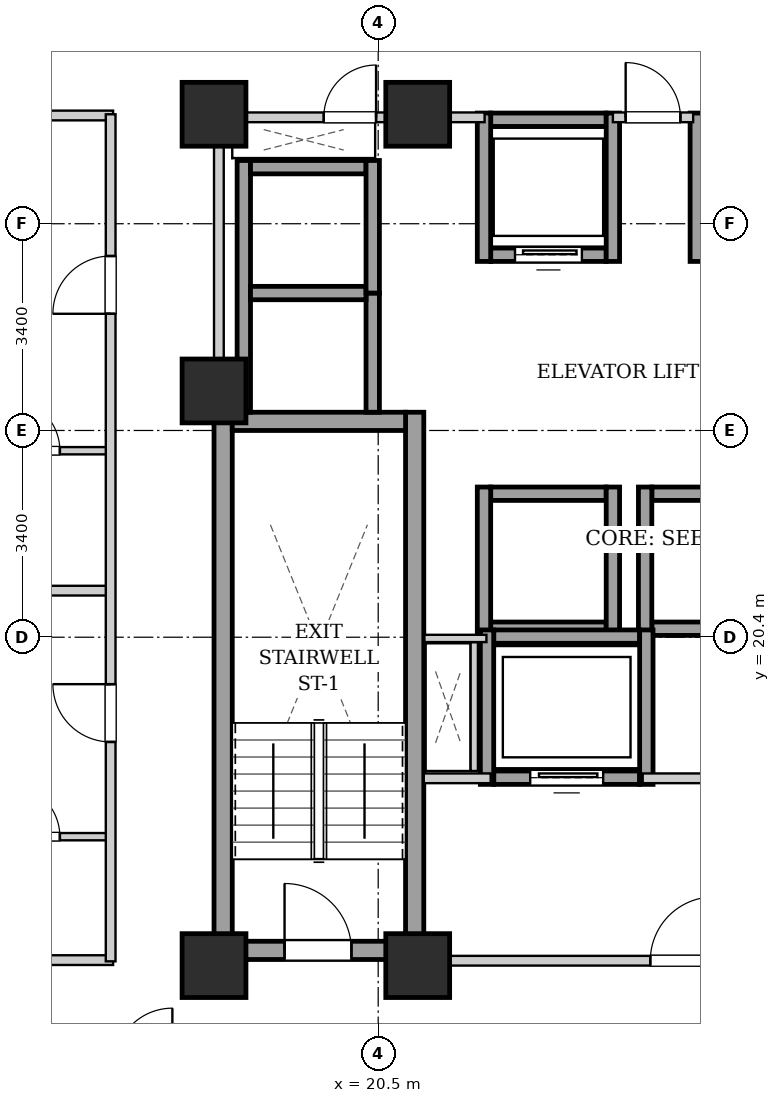
"""IFC4 building model, lengths in metres.
Left out: names, types, materials, properties, quantities, classifications, styles, units other than length and angle.
Written with IfcOpenShell. Run it as: python <this file> out.ifc"""

import sys

from ifc_helpers import new_model, si_unit, direction, frame, frame_2d, origin, origin_2d, place, context, subcontext, project, spatial, rectangle, extrude, element, fill, save


model = new_model("IFC4")
c1 = context("Model", 3, precision=1e-05, world=origin(), true_north=direction((0.0, 1.0)))
c2 = subcontext(c1, "Body", "Model", "MODEL_VIEW")
j1 = project(units=[si_unit("LENGTHUNIT", "METRE"), si_unit("PLANEANGLEUNIT", "RADIAN")], contexts=[c1])
p1 = place(None, origin())
s1 = spatial("IfcSite", under=j1, at=p1, CompositionType="ELEMENT")
p2 = place(p1, origin())
s2 = spatial("IfcBuilding", under=s1, at=p2, CompositionType="ELEMENT")
p3 = place(p2, frame((0.0, 0.0, 87.9)))
s3 = spatial("IfcBuildingStorey", under=s2, at=p3, CompositionType="ELEMENT", Elevation=87.9)
for number, where, z_axis, x_axis in (
    (1, (17.8, 15.0, 0.0), (0.0, 0.0, 1.0), (1.0, 0.0, 0.0)),
    (2, (21.15, 15.0, 0.0), (0.0, 0.0, 1.0), (1.0, 0.0, 0.0)),
    (3, (17.8, 29.0, 0.0), (0.0, 0.0, 1.0), (1.0, 0.0, 0.0)),
    (4, (21.15, 29.0, 0.0), (0.0, 0.0, 1.0), (1.0, 0.0, 0.0)),
    (5, (17.8, 24.45, 0.0), (0.0, 0.0, 1.0), (1.0, 0.0, 0.0)),
):
    element("IfcColumn", number, at=place(p3, frame(where, z_axis=z_axis, x_axis=x_axis)), inside=s3, PredefinedType="COLUMN", context=c2, shape_type="SweptSolid", body=[
        extrude(rectangle(XDim=1.05, YDim=1.05, at=origin_2d()), origin(), (0.0, 0.0, 1.0), 3.2),
    ])
for number, where, z_axis, x_axis in (
    (6, (17.95, 15.1, 0.0), (0.0, 0.0, 1.0), (0.0, 1.0, 0.0)),
    (7, (21.1, 15.1, 0.0), (0.0, 0.0, 1.0), (0.0, 1.0, 0.0)),
):
    element("IfcWall", number, at=place(p3, frame(where, z_axis=z_axis, x_axis=x_axis)), inside=s3, PredefinedType="SHEAR", context=c2, shape_type="SweptSolid", body=[
        extrude(rectangle(XDim=9.0, YDim=0.3, at=frame_2d((4.5, 0.0))), origin(), (0.0, 0.0, 1.0), 2.94),
    ])
p4 = place(p3, frame((18.1, 23.95, 0.0), z_axis=(0.0, 0.0, 1.0), x_axis=(1.0, 0.0, 0.0)))
e8 = element("IfcWall", 8, at=p4, inside=s3, PredefinedType="SHEAR", context=c2, shape_type="SweptSolid", body=[
    extrude(rectangle(XDim=2.85, YDim=0.3, at=frame_2d((1.425, 0.0))), origin(), (0.0, 0.0, 1.0), 2.94),
])
p5 = place(p3, frame((18.1, 15.25, 0.0), z_axis=(0.0, 0.0, 1.0), x_axis=(1.0, 0.0, 0.0)))
e9 = element("IfcWall", 9, at=p5, inside=s3, PredefinedType="SHEAR", context=c2, shape_type="SweptSolid", body=[
    extrude(rectangle(XDim=2.85, YDim=0.3, at=frame_2d((1.425, 0.0))), origin(), (0.0, 0.0, 1.0), 2.94),
])
p6 = place(p5, frame((0.86, 0.0, 0.0)))
e10 = element("IfcOpeningElement", 10, at=p6, cuts=e9, PredefinedType="OPENING", context=c2, shape_type="SweptSolid", body=[
    extrude(rectangle(XDim=1.1, YDim=2.05, at=frame_2d((0.55, 1.025))), frame((0.0, 0.16, 0.0), z_axis=(0.0, -1.0, 0.0), x_axis=(1.0, 0.0, 0.0)), (0.0, 0.0, 1.0), 0.32),
])
p7 = place(p3, frame((22.35, 26.69, 0.0), z_axis=(0.0, 0.0, 1.0), x_axis=(1.0, 0.0, 0.0)))
e11 = element("IfcWall", 11, at=p7, inside=s3, PredefinedType="SHEAR", context=c2, shape_type="SweptSolid", body=[
    extrude(rectangle(XDim=1.9, YDim=0.22, at=frame_2d((0.95, 0.0))), origin(), (0.0, 0.0, 1.0), 2.94),
])
p8 = place(p7, frame((0.4, 0.0, 0.0)))
e12 = element("IfcOpeningElement", 12, at=p8, cuts=e11, PredefinedType="OPENING", context=c2, shape_type="SweptSolid", body=[
    extrude(rectangle(XDim=1.1, YDim=2.15, at=frame_2d((0.55, 1.075))), frame((0.0, 0.12, 0.0), z_axis=(0.0, -1.0, 0.0), x_axis=(1.0, 0.0, 0.0)), (0.0, 0.0, 1.0), 0.24),
])
p9 = place(p3, frame((22.35, 28.91, 0.0), z_axis=(0.0, 0.0, 1.0), x_axis=(1.0, 0.0, 0.0)))
e13 = element("IfcWall", 13, at=p9, inside=s3, PredefinedType="SHEAR", context=c2, shape_type="SweptSolid", body=[
    extrude(rectangle(XDim=1.9, YDim=0.22, at=frame_2d((0.95, 0.0))), origin(), (0.0, 0.0, 1.0), 2.94),
])
for number, where, z_axis, x_axis in (
    (14, (22.24, 26.58, 0.0), (0.0, 0.0, 1.0), (0.0, 1.0, 0.0)),
    (15, (24.36, 26.58, 0.0), (0.0, 0.0, 1.0), (0.0, 1.0, 0.0)),
    (16, (25.74, 26.58, 0.0), (0.0, 0.0, 1.0), (0.0, 1.0, 0.0)),
):
    element("IfcWall", number, at=place(p3, frame(where, z_axis=z_axis, x_axis=x_axis)), inside=s3, PredefinedType="SHEAR", context=c2, shape_type="SweptSolid", body=[
        extrude(rectangle(XDim=2.44, YDim=0.22, at=frame_2d((1.22, 0.0))), origin(), (0.0, 0.0, 1.0), 2.94),
    ])
for number, where, z_axis, x_axis in (
    (17, (22.35, 20.54, 0.0), (0.0, 0.0, 1.0), (1.0, 0.0, 0.0)),
    (18, (22.35, 22.76, 0.0), (0.0, 0.0, 1.0), (1.0, 0.0, 0.0)),
):
    element("IfcWall", number, at=place(p3, frame(where, z_axis=z_axis, x_axis=x_axis)), inside=s3, PredefinedType="SHEAR", context=c2, shape_type="SweptSolid", body=[
        extrude(rectangle(XDim=1.9, YDim=0.22, at=frame_2d((0.95, 0.0))), origin(), (0.0, 0.0, 1.0), 2.94),
    ])
for number, where, z_axis, x_axis in (
    (19, (22.24, 20.43, 0.0), (0.0, 0.0, 1.0), (0.0, 1.0, 0.0)),
    (20, (24.36, 20.43, 0.0), (0.0, 0.0, 1.0), (0.0, 1.0, 0.0)),
):
    element("IfcWall", number, at=place(p3, frame(where, z_axis=z_axis, x_axis=x_axis)), inside=s3, PredefinedType="SHEAR", context=c2, shape_type="SweptSolid", body=[
        extrude(rectangle(XDim=2.44, YDim=0.22, at=frame_2d((1.22, 0.0))), origin(), (0.0, 0.0, 1.0), 2.94),
    ])
for number, where, z_axis, x_axis in (
    (21, (25.0, 20.54, 0.0), (0.0, 0.0, 1.0), (1.0, 0.0, 0.0)),
    (22, (25.0, 22.76, 0.0), (0.0, 0.0, 1.0), (1.0, 0.0, 0.0)),
):
    element("IfcWall", number, at=place(p3, frame(where, z_axis=z_axis, x_axis=x_axis)), inside=s3, PredefinedType="SHEAR", context=c2, shape_type="SweptSolid", body=[
        extrude(rectangle(XDim=1.9, YDim=0.22, at=frame_2d((0.95, 0.0))), origin(), (0.0, 0.0, 1.0), 2.94),
    ])
p10 = place(p3, frame((24.89, 20.43, 0.0), z_axis=(0.0, 0.0, 1.0), x_axis=(0.0, 1.0, 0.0)))
e23 = element("IfcWall", 23, at=p10, inside=s3, PredefinedType="SHEAR", context=c2, shape_type="SweptSolid", body=[
    extrude(rectangle(XDim=2.44, YDim=0.22, at=frame_2d((1.22, 0.0))), origin(), (0.0, 0.0, 1.0), 2.94),
])
p11 = place(p3, frame((18.29, 24.1, 0.0), z_axis=(0.0, 0.0, 1.0), x_axis=(0.0, 1.0, 0.0)))
e24 = element("IfcWall", 24, at=p11, inside=s3, PredefinedType="SHEAR", context=c2, shape_type="SweptSolid", body=[
    extrude(rectangle(XDim=4.14, YDim=0.22, at=frame_2d((2.07, 0.0))), origin(), (0.0, 0.0, 1.0), 2.94),
])
p12 = place(p3, frame((20.41, 24.1, 0.0), z_axis=(0.0, 0.0, 1.0), x_axis=(0.0, 1.0, 0.0)))
e25 = element("IfcWall", 25, at=p12, inside=s3, PredefinedType="SHEAR", context=c2, shape_type="SweptSolid", body=[
    extrude(rectangle(XDim=1.96, YDim=0.22, at=frame_2d((0.98, 0.0))), origin(), (0.0, 0.0, 1.0), 2.94),
])
for number, where, z_axis, x_axis in (
    (26, (18.4, 26.06, 0.0), (0.0, 0.0, 1.0), (1.0, 0.0, 0.0)),
    (27, (18.4, 28.13, 0.0), (0.0, 0.0, 1.0), (1.0, 0.0, 0.0)),
):
    element("IfcWall", number, at=place(p3, frame(where, z_axis=z_axis, x_axis=x_axis)), inside=s3, PredefinedType="SHEAR", context=c2, shape_type="SweptSolid", body=[
        extrude(rectangle(XDim=1.9, YDim=0.22, at=frame_2d((0.95, 0.0))), origin(), (0.0, 0.0, 1.0), 2.94),
    ])
p13 = place(p3, frame((20.41, 26.06, 0.0), z_axis=(0.0, 0.0, 1.0), x_axis=(0.0, 1.0, 0.0)))
e28 = element("IfcWall", 28, at=p13, inside=s3, PredefinedType="SHEAR", context=c2, shape_type="SweptSolid", body=[
    extrude(rectangle(XDim=2.18, YDim=0.22, at=frame_2d((1.09, 0.0))), origin(), (0.0, 0.0, 1.0), 2.94),
])
p14 = place(p3, frame((22.4, 18.09, 0.0), z_axis=(0.0, 0.0, 1.0), x_axis=(1.0, 0.0, 0.0)))
e29 = element("IfcWall", 29, at=p14, inside=s3, PredefinedType="SHEAR", context=c2, shape_type="SweptSolid", body=[
    extrude(rectangle(XDim=2.4, YDim=0.22, at=frame_2d((1.2, 0.0))), origin(), (0.0, 0.0, 1.0), 2.94),
])
p15 = place(p14, frame((0.6, 0.0, 0.0)))
e30 = element("IfcOpeningElement", 30, at=p15, cuts=e29, PredefinedType="OPENING", context=c2, shape_type="SweptSolid", body=[
    extrude(rectangle(XDim=1.2, YDim=2.15, at=frame_2d((0.6, 1.075))), frame((0.0, 0.12, 0.0), z_axis=(0.0, -1.0, 0.0), x_axis=(1.0, 0.0, 0.0)), (0.0, 0.0, 1.0), 0.24),
])
p16 = place(p3, frame((22.4, 20.41, 0.0), z_axis=(0.0, 0.0, 1.0), x_axis=(1.0, 0.0, 0.0)))
e31 = element("IfcWall", 31, at=p16, inside=s3, PredefinedType="SHEAR", context=c2, shape_type="SweptSolid", body=[
    extrude(rectangle(XDim=2.4, YDim=0.22, at=frame_2d((1.2, 0.0))), origin(), (0.0, 0.0, 1.0), 2.94),
])
for number, where, z_axis, x_axis in (
    (32, (22.29, 17.98, 0.0), (0.0, 0.0, 1.0), (0.0, 1.0, 0.0)),
    (33, (24.91, 17.98, 0.0), (0.0, 0.0, 1.0), (0.0, 1.0, 0.0)),
):
    element("IfcWall", number, at=place(p3, frame(where, z_axis=z_axis, x_axis=x_axis)), inside=s3, PredefinedType="SHEAR", context=c2, shape_type="SweptSolid", body=[
        extrude(rectangle(XDim=2.54, YDim=0.22, at=frame_2d((1.27, 0.0))), origin(), (0.0, 0.0, 1.0), 2.94),
    ])
p17 = place(p3, frame((21.25, 15.08, 0.0), z_axis=(0.0, 0.0, 1.0), x_axis=(1.0, 0.0, 0.0)))
e34 = element("IfcWall", 34, at=p17, inside=s3, PredefinedType="PARTITIONING", context=c2, shape_type="SweptSolid", body=[
    extrude(rectangle(XDim=8.5, YDim=0.16, at=frame_2d((4.25, 0.0))), origin(), (0.0, 0.0, 1.0), 2.309),
])
p18 = place(p17, frame((3.725, 0.0, 0.0)))
e35 = element("IfcOpeningElement", 35, at=p18, cuts=e34, PredefinedType="OPENING", context=c2, shape_type="SweptSolid", body=[
    extrude(rectangle(XDim=1.05, YDim=2.05, at=frame_2d((0.525, 1.025))), frame((0.0, 0.09, 0.0), z_axis=(0.0, -1.0, 0.0), x_axis=(1.0, 0.0, 0.0)), (0.0, 0.0, 1.0), 0.18),
])
p19 = place(p3, frame((21.25, 18.08, 0.0), z_axis=(0.0, 0.0, 1.0), x_axis=(1.0, 0.0, 0.0)))
e36 = element("IfcWall", 36, at=p19, inside=s3, PredefinedType="PARTITIONING", context=c2, shape_type="SweptSolid", body=[
    extrude(rectangle(XDim=1.1, YDim=0.16, at=frame_2d((0.55, 0.0))), origin(), (0.0, 0.0, 1.0), 2.94),
])
p20 = place(p3, frame((24.85, 18.08, 0.0), z_axis=(0.0, 0.0, 1.0), x_axis=(1.0, 0.0, 0.0)))
e37 = element("IfcWall", 37, at=p20, inside=s3, PredefinedType="PARTITIONING", context=c2, shape_type="SweptSolid", body=[
    extrude(rectangle(XDim=1.3, YDim=0.16, at=frame_2d((0.65, 0.0))), origin(), (0.0, 0.0, 1.0), 2.94),
])
p21 = place(p3, frame((17.88, 24.12, 0.0), z_axis=(0.0, 0.0, 1.0), x_axis=(0.0, 1.0, 0.0)))
e38 = element("IfcWall", 38, at=p21, inside=s3, PredefinedType="PARTITIONING", context=c2, shape_type="SweptSolid", body=[
    extrude(rectangle(XDim=4.76, YDim=0.16, at=frame_2d((2.38, 0.0))), origin(), (0.0, 0.0, 1.0), 2.275),
])
p22 = place(p3, frame((24.36, 28.95, 0.0), z_axis=(0.0, 0.0, 1.0), x_axis=(1.0, 0.0, 0.0)))
e39 = element("IfcWall", 39, at=p22, inside=s3, PredefinedType="PARTITIONING", context=c2, shape_type="SweptSolid", body=[
    extrude(rectangle(XDim=1.32, YDim=0.16, at=frame_2d((0.66, 0.0))), origin(), (0.0, 0.0, 1.0), 2.309),
])
p23 = place(p22, frame((0.21, 0.0, 0.0)))
e40 = element("IfcOpeningElement", 40, at=p23, cuts=e39, PredefinedType="OPENING", context=c2, shape_type="SweptSolid", body=[
    extrude(rectangle(XDim=0.9, YDim=2.05, at=frame_2d((0.45, 1.025))), frame((0.0, 0.09, 0.0), z_axis=(0.0, -1.0, 0.0), x_axis=(1.0, 0.0, 0.0)), (0.0, 0.0, 1.0), 0.18),
])
p24 = place(p3, frame((17.96, 28.95, 0.0), z_axis=(0.0, 0.0, 1.0), x_axis=(1.0, 0.0, 0.0)))
e41 = element("IfcWall", 41, at=p24, inside=s3, PredefinedType="PARTITIONING", context=c2, shape_type="SweptSolid", body=[
    extrude(rectangle(XDim=4.29, YDim=0.16, at=frame_2d((2.145, 0.0))), origin(), (0.0, 0.0, 1.0), 2.309),
])
p25 = place(p24, frame((1.645, 0.0, 0.0)))
e42 = element("IfcOpeningElement", 42, at=p25, cuts=e41, PredefinedType="OPENING", context=c2, shape_type="SweptSolid", body=[
    extrude(rectangle(XDim=0.86, YDim=2.05, at=frame_2d((0.43, 1.025))), frame((0.0, 0.09, 0.0), z_axis=(0.0, -1.0, 0.0), x_axis=(1.0, 0.0, 0.0)), (0.0, 0.0, 1.0), 0.18),
])
p26 = place(p3, frame((22.08, 18.2, 0.0), z_axis=(0.0, 0.0, 1.0), x_axis=(0.0, 1.0, 0.0)))
e43 = element("IfcWall", 43, at=p26, inside=s3, PredefinedType="PARTITIONING", context=c2, shape_type="SweptSolid", body=[
    extrude(rectangle(XDim=2.12, YDim=0.12, at=frame_2d((1.06, 0.0))), origin(), (0.0, 0.0, 1.0), 2.94),
])
p27 = place(p3, frame((22.28, 20.38, 0.0), z_axis=(0.0, 0.0, 1.0), x_axis=(-1.0, 0.0, 0.0)))
e44 = element("IfcWall", 44, at=p27, inside=s3, PredefinedType="PARTITIONING", context=c2, shape_type="SweptSolid", body=[
    extrude(rectangle(XDim=1.02, YDim=0.12, at=frame_2d((0.51, 0.0))), origin(), (0.0, 0.0, 1.0), 2.94),
])
for number, where, z_axis, x_axis in (
    (45, (7.78, 15.09, 0.0), (0.0, 0.0, 1.0), (1.0, 0.0, 0.0)),
    (46, (7.78, 28.98, 0.0), (0.0, 0.0, 1.0), (1.0, 0.0, 0.0)),
):
    element("IfcWall", number, at=place(p3, frame(where, z_axis=z_axis, x_axis=x_axis)), inside=s3, PredefinedType="PARTITIONING", context=c2, shape_type="SweptSolid", body=[
        extrude(rectangle(XDim=8.36, YDim=0.16, at=frame_2d((4.18, 0.0))), origin(), (0.0, 0.0, 1.0), 2.309),
    ])
p28 = place(p3, frame((9.82, 21.166, 0.0), z_axis=(0.0, 0.0, 1.0), x_axis=(1.0, 0.0, 0.0)))
e47 = element("IfcWall", 47, at=p28, inside=s3, PredefinedType="PARTITIONING", context=c2, shape_type="SweptSolid", body=[
    extrude(rectangle(XDim=6.24, YDim=0.16, at=frame_2d((3.12, 0.0))), origin(), (0.0, 0.0, 1.0), 2.94),
])
p29 = place(p3, frame((13.61, 17.12, 0.0), z_axis=(0.0, 0.0, 1.0), x_axis=(1.0, 0.0, 0.0)))
e48 = element("IfcWall", 48, at=p29, inside=s3, PredefinedType="PARTITIONING", context=c2, shape_type="SweptSolid", body=[
    extrude(rectangle(XDim=2.45, YDim=0.12, at=frame_2d((1.225, 0.0))), origin(), (0.0, 0.0, 1.0), 2.94),
])
p30 = place(p29, frame((0.795, 0.0, 0.0)))
e49 = element("IfcOpeningElement", 49, at=p30, cuts=e48, PredefinedType="OPENING", context=c2, shape_type="SweptSolid", body=[
    extrude(rectangle(XDim=0.86, YDim=2.05, at=frame_2d((0.43, 1.025))), frame((0.0, 0.07, 0.0), z_axis=(0.0, -1.0, 0.0), x_axis=(1.0, 0.0, 0.0)), (0.0, 0.0, 1.0), 0.14),
])
p31 = place(p3, frame((13.61, 23.467, 0.0), z_axis=(0.0, 0.0, 1.0), x_axis=(1.0, 0.0, 0.0)))
e50 = element("IfcWall", 50, at=p31, inside=s3, PredefinedType="PARTITIONING", context=c2, shape_type="SweptSolid", body=[
    extrude(rectangle(XDim=2.45, YDim=0.12, at=frame_2d((1.225, 0.0))), origin(), (0.0, 0.0, 1.0), 2.94),
])
p32 = place(p31, frame((0.795, 0.0, 0.0)))
e51 = element("IfcOpeningElement", 51, at=p32, cuts=e50, PredefinedType="OPENING", context=c2, shape_type="SweptSolid", body=[
    extrude(rectangle(XDim=0.86, YDim=2.05, at=frame_2d((0.43, 1.025))), frame((0.0, 0.07, 0.0), z_axis=(0.0, -1.0, 0.0), x_axis=(1.0, 0.0, 0.0)), (0.0, 0.0, 1.0), 0.14),
])
p33 = place(p3, frame((16.1, 15.07, 0.0), z_axis=(0.0, 0.0, 1.0), x_axis=(0.0, 1.0, 0.0)))
e52 = element("IfcWall", 52, at=p33, inside=s3, PredefinedType="PARTITIONING", context=c2, shape_type="SweptSolid", body=[
    extrude(rectangle(XDim=13.93, YDim=0.16, at=frame_2d((6.965, 0.0))), origin(), (0.0, 0.0, 1.0), 2.94),
])
p34 = place(p33, frame((3.608, 0.0, 0.0)))
e53 = element("IfcOpeningElement", 53, at=p34, cuts=e52, PredefinedType="OPENING", context=c2, shape_type="SweptSolid", body=[
    extrude(rectangle(XDim=0.95, YDim=2.1, at=frame_2d((0.475, 1.05))), frame((0.0, 0.09, 0.0), z_axis=(0.0, -1.0, 0.0), x_axis=(1.0, 0.0, 0.0)), (0.0, 0.0, 1.0), 0.18),
])
p35 = place(p33, frame((10.649, 0.0, 0.0)))
e54 = element("IfcOpeningElement", 54, at=p35, cuts=e52, PredefinedType="OPENING", context=c2, shape_type="SweptSolid", body=[
    extrude(rectangle(XDim=0.95, YDim=2.1, at=frame_2d((0.475, 1.05))), frame((0.0, 0.09, 0.0), z_axis=(0.0, -1.0, 0.0), x_axis=(1.0, 0.0, 0.0)), (0.0, 0.0, 1.0), 0.18),
])
p36 = place(p6, origin())
e55 = element("IfcDoor", 55, at=p36, inside=s3, OperationType="SINGLE_SWING_LEFT", PredefinedType="DOOR", context=c2, shape_type="SweptSolid", body=[
    extrude(rectangle(XDim=1.1, YDim=2.05, at=frame_2d((0.55, 1.025))), frame((0.0, 0.025, 0.0), z_axis=(0.0, -1.0, 0.0), x_axis=(1.0, 0.0, 0.0)), (0.0, 0.0, 1.0), 0.05),
])
fill(e10, e55)
p37 = place(p8, origin())
e56 = element("IfcDoor", 56, at=p37, inside=s3, OperationType="SLIDING_TO_LEFT", PredefinedType="DOOR", context=c2, shape_type="SweptSolid", body=[
    extrude(rectangle(XDim=1.1, YDim=2.15, at=frame_2d((0.55, 1.075))), frame((0.0, 0.025, 0.0), z_axis=(0.0, -1.0, 0.0), x_axis=(1.0, 0.0, 0.0)), (0.0, 0.0, 1.0), 0.05),
])
fill(e12, e56)
p38 = place(p15, origin())
e57 = element("IfcDoor", 57, at=p38, inside=s3, OperationType="SLIDING_TO_LEFT", PredefinedType="DOOR", context=c2, shape_type="SweptSolid", body=[
    extrude(rectangle(XDim=1.2, YDim=2.15, at=frame_2d((0.6, 1.075))), frame((0.0, 0.025, 0.0), z_axis=(0.0, -1.0, 0.0), x_axis=(1.0, 0.0, 0.0)), (0.0, 0.0, 1.0), 0.05),
])
fill(e30, e57)
p39 = place(p18, origin())
e58 = element("IfcDoor", 58, at=p39, inside=s3, OperationType="SINGLE_SWING_RIGHT", PredefinedType="DOOR", context=c2, shape_type="SweptSolid", body=[
    extrude(rectangle(XDim=1.05, YDim=2.05, at=frame_2d((0.525, 1.025))), frame((0.0, 0.025, 0.0), z_axis=(0.0, -1.0, 0.0), x_axis=(1.0, 0.0, 0.0)), (0.0, 0.0, 1.0), 0.05),
])
fill(e35, e58)
p40 = place(p23, origin())
e59 = element("IfcDoor", 59, at=p40, inside=s3, OperationType="SINGLE_SWING_LEFT", PredefinedType="DOOR", context=c2, shape_type="SweptSolid", body=[
    extrude(rectangle(XDim=0.9, YDim=2.05, at=frame_2d((0.45, 1.025))), frame((0.0, 0.025, 0.0), z_axis=(0.0, -1.0, 0.0), x_axis=(1.0, 0.0, 0.0)), (0.0, 0.0, 1.0), 0.05),
])
fill(e40, e59)
p41 = place(p25, origin())
e60 = element("IfcDoor", 60, at=p41, inside=s3, OperationType="SINGLE_SWING_RIGHT", PredefinedType="DOOR", context=c2, shape_type="SweptSolid", body=[
    extrude(rectangle(XDim=0.86, YDim=2.05, at=frame_2d((0.43, 1.025))), frame((0.0, 0.025, 0.0), z_axis=(0.0, -1.0, 0.0), x_axis=(1.0, 0.0, 0.0)), (0.0, 0.0, 1.0), 0.05),
])
fill(e42, e60)
p42 = place(p30, origin())
e61 = element("IfcDoor", 61, at=p42, inside=s3, OperationType="SINGLE_SWING_LEFT", PredefinedType="DOOR", context=c2, shape_type="SweptSolid", body=[
    extrude(rectangle(XDim=0.86, YDim=2.05, at=frame_2d((0.43, 1.025))), frame((0.0, 0.025, 0.0), z_axis=(0.0, -1.0, 0.0), x_axis=(1.0, 0.0, 0.0)), (0.0, 0.0, 1.0), 0.05),
])
fill(e49, e61)
p43 = place(p32, origin())
e62 = element("IfcDoor", 62, at=p43, inside=s3, OperationType="SINGLE_SWING_LEFT", PredefinedType="DOOR", context=c2, shape_type="SweptSolid", body=[
    extrude(rectangle(XDim=0.86, YDim=2.05, at=frame_2d((0.43, 1.025))), frame((0.0, 0.025, 0.0), z_axis=(0.0, -1.0, 0.0), x_axis=(1.0, 0.0, 0.0)), (0.0, 0.0, 1.0), 0.05),
])
fill(e51, e62)
p44 = place(p34, origin())
e63 = element("IfcDoor", 63, at=p44, inside=s3, OperationType="SINGLE_SWING_RIGHT", PredefinedType="DOOR", context=c2, shape_type="SweptSolid", body=[
    extrude(rectangle(XDim=0.95, YDim=2.1, at=frame_2d((0.475, 1.05))), frame((0.0, 0.025, 0.0), z_axis=(0.0, -1.0, 0.0), x_axis=(1.0, 0.0, 0.0)), (0.0, 0.0, 1.0), 0.05),
])
fill(e53, e63)
p45 = place(p35, origin())
e64 = element("IfcDoor", 64, at=p45, inside=s3, OperationType="SINGLE_SWING_LEFT", PredefinedType="DOOR", context=c2, shape_type="SweptSolid", body=[
    extrude(rectangle(XDim=0.95, YDim=2.1, at=frame_2d((0.475, 1.05))), frame((0.0, 0.025, 0.0), z_axis=(0.0, -1.0, 0.0), x_axis=(1.0, 0.0, 0.0)), (0.0, 0.0, 1.0), 0.05),
])
fill(e54, e64)
save(model, sys.argv[1])
